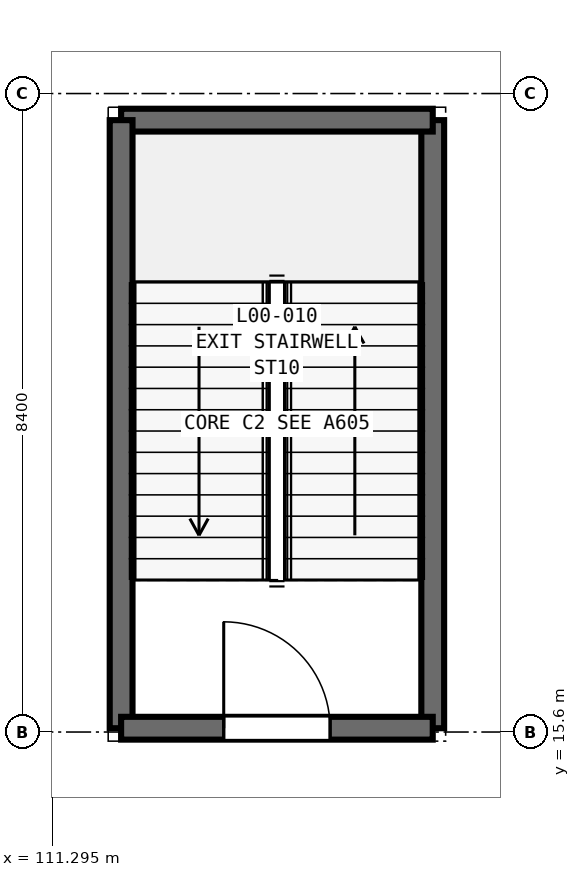
"""IFC4 building model, lengths in metres.
Left out: names, types, materials, properties, quantities, classifications, styles, units other than length and angle.
Written with IfcOpenShell. Run it as: python <this file> out.ifc"""

import sys

from ifc_helpers import new_model, si_unit, direction, frame, frame_2d, origin, place, context, subcontext, project, spatial, rectangle, extrude, element, fill, save


model = new_model("IFC4")
c1 = context("Model", 3, precision=1e-05, world=origin(), true_north=direction((0.0, 1.0)))
c2 = subcontext(c1, "Body", "Model", "MODEL_VIEW")
j1 = project(units=[si_unit("LENGTHUNIT", "METRE"), si_unit("PLANEANGLEUNIT", "RADIAN")], contexts=[c1])
p1 = place(None, origin())
s1 = spatial("IfcSite", under=j1, at=p1, CompositionType="ELEMENT")
p2 = place(p1, origin())
s2 = spatial("IfcBuilding", under=s1, at=p2, CompositionType="ELEMENT")
p3 = place(p2, origin())
s3 = spatial("IfcBuildingStorey", under=s2, at=p3, CompositionType="ELEMENT", Elevation=0.0)
p4 = place(p3, frame((116.3, 15.65, 0.0), z_axis=(0.0, 0.0, 1.0), x_axis=(0.0, 1.0, 0.0)))
e1 = element("IfcWall", 1, at=p4, inside=s3, PredefinedType="SHEAR", context=c2, shape_type="SweptSolid", body=[
    extrude(rectangle(XDim=8.0, YDim=0.3, at=frame_2d((4.0, 0.0))), origin(), (0.0, 0.0, 1.0), 5.4),
])
p5 = place(p3, frame((116.3, 23.65, 0.0), z_axis=(0.0, 0.0, 1.0), x_axis=(-1.0, 0.0, 0.0)))
e2 = element("IfcWall", 2, at=p5, inside=s3, PredefinedType="SHEAR", context=c2, shape_type="SweptSolid", body=[
    extrude(rectangle(XDim=4.1, YDim=0.3, at=frame_2d((2.05, 0.0))), origin(), (0.0, 0.0, 1.0), 5.4),
])
p6 = place(p3, frame((112.2, 23.65, 0.0), z_axis=(0.0, 0.0, 1.0), x_axis=(0.0, -1.0, 0.0)))
e3 = element("IfcWall", 3, at=p6, inside=s3, PredefinedType="SHEAR", context=c2, shape_type="SweptSolid", body=[
    extrude(rectangle(XDim=8.0, YDim=0.3, at=frame_2d((4.0, 0.0))), origin(), (0.0, 0.0, 1.0), 5.4),
])
p7 = place(p3, frame((112.2, 15.65, 0.0), z_axis=(0.0, 0.0, 1.0), x_axis=(1.0, 0.0, 0.0)))
e4 = element("IfcWall", 4, at=p7, inside=s3, PredefinedType="SHEAR", context=c2, shape_type="SweptSolid", body=[
    extrude(rectangle(XDim=4.1, YDim=0.3, at=frame_2d((2.05, 0.0))), origin(), (0.0, 0.0, 1.0), 5.4),
])
p8 = place(p7, frame((1.35, 0.0, 0.0)))
e5 = element("IfcOpeningElement", 5, at=p8, cuts=e4, PredefinedType="OPENING", context=c2, shape_type="SweptSolid", body=[
    extrude(rectangle(XDim=1.4, YDim=2.2, at=frame_2d((0.7, 1.1))), frame((0.0, 0.16, 0.0), z_axis=(0.0, -1.0, 0.0), x_axis=(1.0, 0.0, 0.0)), (0.0, 0.0, 1.0), 0.32),
])
p9 = place(p8, origin())
e6 = element("IfcDoor", 6, at=p9, inside=s3, OperationType="SINGLE_SWING_LEFT", PredefinedType="DOOR", context=c2, shape_type="SweptSolid", body=[
    extrude(rectangle(XDim=1.4, YDim=2.2, at=frame_2d((0.7, 1.1))), frame((0.0, 0.025, 0.0), z_axis=(0.0, -1.0, 0.0), x_axis=(1.0, 0.0, 0.0)), (0.0, 0.0, 1.0), 0.05),
])
fill(e5, e6)
save(model, sys.argv[1])
